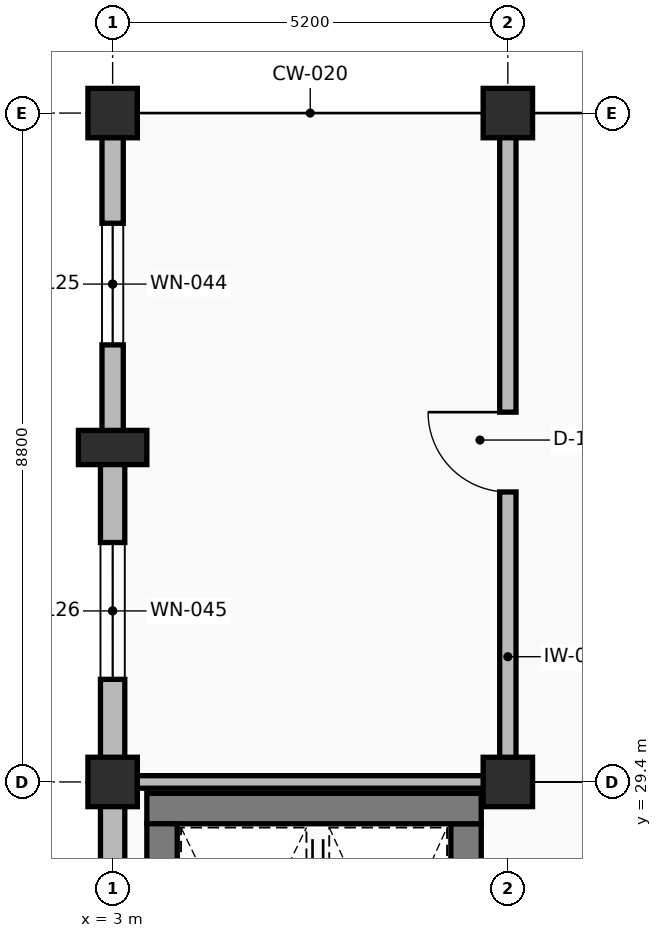
"""IFC4 building model, lengths in metres.
Left out: names, types, materials, properties, quantities, classifications, styles, units other than length and angle.
Written with IfcOpenShell. Run it as: python <this file> out.ifc"""

import sys

from ifc_helpers import new_model, si_unit, direction, frame, frame_2d, origin, origin_2d, place, context, subcontext, project, spatial, rectangle, extrude, element, fill, save


model = new_model("IFC4")
c1 = context("Model", 3, precision=1e-05, world=origin(), true_north=direction((0.0, 1.0)))
c2 = subcontext(c1, "Body", "Model", "MODEL_VIEW")
j1 = project(units=[si_unit("LENGTHUNIT", "METRE"), si_unit("PLANEANGLEUNIT", "RADIAN")], contexts=[c1])
p1 = place(None, origin())
s1 = spatial("IfcSite", under=j1, at=p1, CompositionType="ELEMENT")
p2 = place(p1, origin())
s2 = spatial("IfcBuilding", under=s1, at=p2, CompositionType="ELEMENT")
p3 = place(p2, frame((0.0, 0.0, 14.4)))
s3 = spatial("IfcBuildingStorey", under=s2, at=p3, CompositionType="ELEMENT", Elevation=14.4)
for number, where, z_axis, x_axis in (
    (1, (3.0, 29.4, 0.0), (0.0, 0.0, 1.0), (1.0, 0.0, 0.0)),
    (2, (3.0, 38.2, 0.0), (0.0, 0.0, 1.0), (1.0, 0.0, 0.0)),
    (3, (8.2, 29.4, 0.0), (0.0, 0.0, 1.0), (1.0, 0.0, 0.0)),
    (4, (8.2, 38.2, 0.0), (0.0, 0.0, 1.0), (1.0, 0.0, 0.0)),
):
    element("IfcColumn", number, at=place(p3, frame(where, z_axis=z_axis, x_axis=x_axis)), inside=s3, PredefinedType="COLUMN", context=c2, shape_type="SweptSolid", body=[
        extrude(rectangle(XDim=0.65, YDim=0.65, at=origin_2d()), origin(), (0.0, 0.0, 1.0), 4.5),
    ])
p4 = place(p3, frame((3.0, 33.8, 0.0), z_axis=(0.0, 0.0, 1.0), x_axis=(0.0, 1.0, 0.0)))
e5 = element("IfcColumn", 5, at=p4, inside=s3, PredefinedType="PILASTER", context=c2, shape_type="SweptSolid", body=[
    extrude(rectangle(XDim=0.45, YDim=0.9, at=origin_2d()), origin(), (0.0, 0.0, 1.0), 4.5),
])
p5 = place(p3, frame((3.0, 29.08, 0.0), z_axis=(0.0, 0.0, 1.0), x_axis=(0.0, -1.0, 0.0)))
e6 = element("IfcWall", 6, at=p5, inside=s3, PredefinedType="SOLIDWALL", context=c2, shape_type="SweptSolid", body=[
    extrude(rectangle(XDim=8.16, YDim=0.32, at=frame_2d((4.08, 0.0))), origin(), (0.0, 0.0, 1.0), 3.475),
])
p6 = place(p5, frame((3.33, 0.0, 0.9)))
e7 = element("IfcOpeningElement", 7, at=p6, cuts=e6, PredefinedType="OPENING", context=c2, shape_type="SweptSolid", body=[
    extrude(rectangle(XDim=1.5, YDim=1.5, at=frame_2d((0.75, 0.75))), frame((0.0, 0.17, 0.0), z_axis=(0.0, -1.0, 0.0), x_axis=(1.0, 0.0, 0.0)), (0.0, 0.0, 1.0), 0.34),
])
p7 = place(p3, frame((3.0, 37.88, 0.0), z_axis=(0.0, 0.0, 1.0), x_axis=(0.0, -1.0, 0.0)))
e8 = element("IfcWall", 8, at=p7, inside=s3, PredefinedType="SOLIDWALL", context=c2, shape_type="SweptSolid", body=[
    extrude(rectangle(XDim=3.86, YDim=0.28, at=frame_2d((1.93, 0.0))), origin(), (0.0, 0.0, 1.0), 3.475),
])
p8 = place(p7, frame((1.13, 0.0, 0.9)))
e9 = element("IfcOpeningElement", 9, at=p8, cuts=e8, PredefinedType="OPENING", context=c2, shape_type="SweptSolid", body=[
    extrude(rectangle(XDim=1.6, YDim=1.55, at=frame_2d((0.8, 0.775))), frame((0.0, 0.15, 0.0), z_axis=(0.0, -1.0, 0.0), x_axis=(1.0, 0.0, 0.0)), (0.0, 0.0, 1.0), 0.3),
])
p9 = place(p3, frame((3.0, 33.58, 0.0), z_axis=(0.0, 0.0, 1.0), x_axis=(0.0, -1.0, 0.0)))
e10 = element("IfcWall", 10, at=p9, inside=s3, PredefinedType="SOLIDWALL", context=c2, shape_type="SweptSolid", body=[
    extrude(rectangle(XDim=3.86, YDim=0.32, at=frame_2d((1.93, 0.0))), origin(), (0.0, 0.0, 1.0), 3.475),
])
p10 = place(p9, frame((1.03, 0.0, 0.9)))
e11 = element("IfcOpeningElement", 11, at=p10, cuts=e10, PredefinedType="OPENING", context=c2, shape_type="SweptSolid", body=[
    extrude(rectangle(XDim=1.8, YDim=1.5, at=frame_2d((0.9, 0.75))), frame((0.0, 0.17, 0.0), z_axis=(0.0, -1.0, 0.0), x_axis=(1.0, 0.0, 0.0)), (0.0, 0.0, 1.0), 0.34),
])
p11 = place(p3, frame((7.65, 25.35, 0.0), z_axis=(0.0, 0.0, 1.0), x_axis=(0.0, 1.0, 0.0)))
e12 = element("IfcWall", 12, at=p11, inside=s3, PredefinedType="SHEAR", context=c2, shape_type="SweptSolid", body=[
    extrude(rectangle(XDim=3.5, YDim=0.4, at=frame_2d((1.75, 0.0))), origin(), (0.0, 0.0, 1.0), 4.19),
])
p12 = place(p3, frame((7.85, 29.05, 0.0), z_axis=(0.0, 0.0, 1.0), x_axis=(-1.0, 0.0, 0.0)))
e13 = element("IfcWall", 13, at=p12, inside=s3, PredefinedType="SHEAR", context=c2, shape_type="SweptSolid", body=[
    extrude(rectangle(XDim=4.4, YDim=0.4, at=frame_2d((2.2, 0.0))), origin(), (0.0, 0.0, 1.0), 4.19),
])
p13 = place(p3, frame((3.65, 28.85, 0.0), z_axis=(0.0, 0.0, 1.0), x_axis=(0.0, -1.0, 0.0)))
e14 = element("IfcWall", 14, at=p13, inside=s3, PredefinedType="SHEAR", context=c2, shape_type="SweptSolid", body=[
    extrude(rectangle(XDim=3.5, YDim=0.4, at=frame_2d((1.75, 0.0))), origin(), (0.0, 0.0, 1.0), 4.19),
])
p14 = place(p3, frame((3.2, 29.4, 0.0), z_axis=(0.0, 0.0, 1.0), x_axis=(1.0, 0.0, 0.0)))
e15 = element("IfcWall", 15, at=p14, inside=s3, PredefinedType="PARTITIONING", context=c2, shape_type="SweptSolid", body=[
    extrude(rectangle(XDim=5.0, YDim=0.165, at=frame_2d((2.5, 0.0))), origin(), (0.0, 0.0, 1.0), 3.365),
])
p15 = place(p3, frame((8.2, 29.48, 0.0), z_axis=(0.0, 0.0, 1.0), x_axis=(0.0, 1.0, 0.0)))
e16 = element("IfcWall", 16, at=p15, inside=s3, PredefinedType="PARTITIONING", context=c2, shape_type="SweptSolid", body=[
    extrude(rectangle(XDim=8.52, YDim=0.215, at=frame_2d((4.26, 0.0))), origin(), (0.0, 0.0, 1.0), 3.365),
])
p16 = place(p15, frame((3.735, 0.0, 0.0)))
e17 = element("IfcOpeningElement", 17, at=p16, cuts=e16, PredefinedType="OPENING", context=c2, shape_type="SweptSolid", body=[
    extrude(rectangle(XDim=1.05, YDim=2.15, at=frame_2d((0.525, 1.075))), frame((0.0, 0.117, 0.0), z_axis=(0.0, -1.0, 0.0), x_axis=(1.0, 0.0, 0.0)), (0.0, 0.0, 1.0), 0.235),
])
p17 = place(p8, origin())
e18 = element("IfcWindow", 18, at=p17, inside=s3, PartitioningType="SINGLE_PANEL", PredefinedType="WINDOW", context=c2, shape_type="SweptSolid", body=[
    extrude(rectangle(XDim=1.6, YDim=1.55, at=frame_2d((0.8, 0.775))), frame((0.0, 0.03, 0.0), z_axis=(0.0, -1.0, 0.0), x_axis=(1.0, 0.0, 0.0)), (0.0, 0.0, 1.0), 0.06),
])
fill(e9, e18)
p18 = place(p10, origin())
e19 = element("IfcWindow", 19, at=p18, inside=s3, PartitioningType="SINGLE_PANEL", PredefinedType="WINDOW", context=c2, shape_type="SweptSolid", body=[
    extrude(rectangle(XDim=1.8, YDim=1.5, at=frame_2d((0.9, 0.75))), frame((0.0, 0.03, 0.0), z_axis=(0.0, -1.0, 0.0), x_axis=(1.0, 0.0, 0.0)), (0.0, 0.0, 1.0), 0.06),
])
fill(e11, e19)
p19 = place(p16, origin())
e20 = element("IfcDoor", 20, at=p19, inside=s3, OperationType="SINGLE_SWING_RIGHT", PredefinedType="DOOR", context=c2, shape_type="SweptSolid", body=[
    extrude(rectangle(XDim=1.05, YDim=2.15, at=frame_2d((0.525, 1.075))), frame((0.0, 0.025, 0.0), z_axis=(0.0, -1.0, 0.0), x_axis=(1.0, 0.0, 0.0)), (0.0, 0.0, 1.0), 0.05),
])
fill(e17, e20)
save(model, sys.argv[1])
